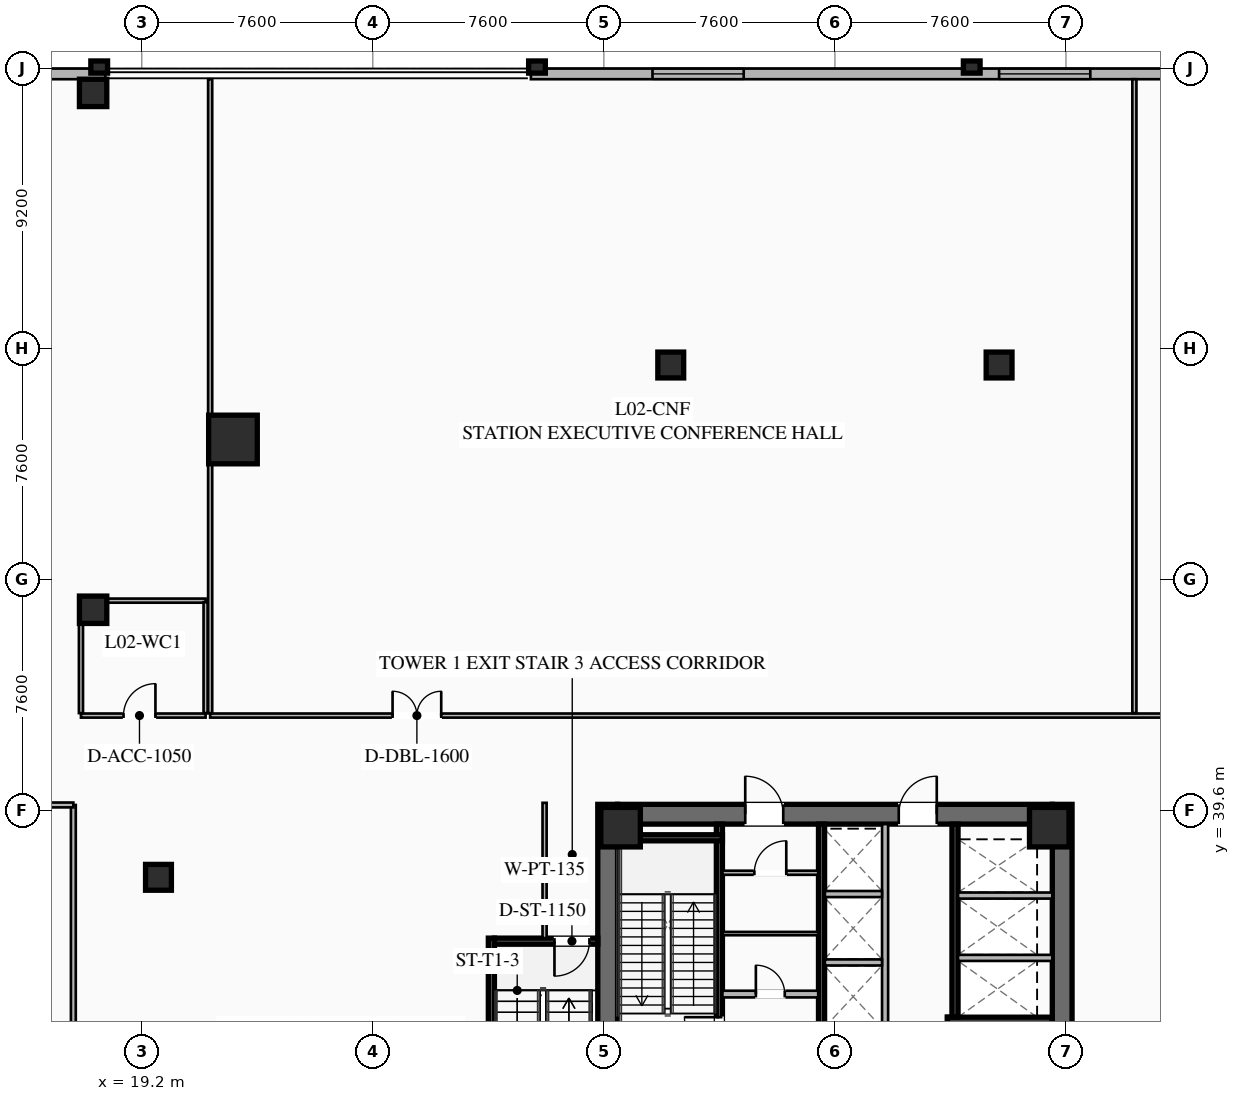
"""IFC4 building model, lengths in metres.
Left out: names, types, materials, properties, quantities, classifications, styles, units other than length and angle.
Written with IfcOpenShell. Run it as: python <this file> out.ifc"""

import sys

from ifc_helpers import new_model, si_unit, direction, frame, frame_2d, origin, origin_2d, place, context, subcontext, project, spatial, rectangle, hollow_rectangle, extrude, element, fill, save


model = new_model("IFC4")
c1 = context("Model", 3, precision=1e-05, world=origin(), true_north=direction((0.0, 1.0)))
c2 = subcontext(c1, "Body", "Model", "MODEL_VIEW")
j1 = project(units=[si_unit("LENGTHUNIT", "METRE"), si_unit("PLANEANGLEUNIT", "RADIAN")], contexts=[c1])
p1 = place(None, origin())
s1 = spatial("IfcSite", under=j1, at=p1, CompositionType="ELEMENT")
p2 = place(p1, origin())
s2 = spatial("IfcBuilding", under=s1, at=p2, CompositionType="ELEMENT")
p3 = place(p2, frame((0.0, 0.0, 10.2)))
s3 = spatial("IfcBuildingStorey", under=s2, at=p3, CompositionType="ELEMENT", Elevation=10.2)
for number, where, z_axis, x_axis in (
    (1, (34.525, 24.2, 0.0), (0.0, 0.0, 1.0), (0.0, 1.0, 0.0)),
    (2, (49.475, 39.8, 0.0), (0.0, 0.0, 1.0), (0.0, -1.0, 0.0)),
):
    element("IfcWall", number, at=place(p3, frame(where, z_axis=z_axis, x_axis=x_axis)), inside=s3, PredefinedType="SHEAR", context=c2, shape_type="SweptSolid", body=[
        extrude(rectangle(XDim=15.6, YDim=0.65, at=frame_2d((7.8, 0.0))), origin(), (0.0, 0.0, 1.0), 5.4),
    ])
p4 = place(p3, frame((34.85, 39.475, 0.0), z_axis=(0.0, 0.0, 1.0), x_axis=(1.0, 0.0, 0.0)))
e3 = element("IfcWall", 3, at=p4, inside=s3, PredefinedType="SHEAR", context=c2, shape_type="SweptSolid", body=[
    extrude(rectangle(XDim=14.3, YDim=0.65, at=frame_2d((7.15, 0.0))), origin(), (0.0, 0.0, 1.0), 5.4),
])
p5 = place(p4, frame((4.2, 0.0, 0.0)))
e4 = element("IfcOpeningElement", 4, at=p5, cuts=e3, PredefinedType="OPENING", context=c2, shape_type="SweptSolid", body=[
    extrude(rectangle(XDim=1.25, YDim=2.25, at=frame_2d((0.625, 1.125))), frame((0.0, 0.335, 0.0), z_axis=(0.0, -1.0, 0.0), x_axis=(1.0, 0.0, 0.0)), (0.0, 0.0, 1.0), 0.67),
])
p6 = place(p4, frame((9.25, 0.0, 0.0)))
e5 = element("IfcOpeningElement", 5, at=p6, cuts=e3, PredefinedType="OPENING", context=c2, shape_type="SweptSolid", body=[
    extrude(rectangle(XDim=1.25, YDim=2.25, at=frame_2d((0.625, 1.125))), frame((0.0, 0.335, 0.0), z_axis=(0.0, -1.0, 0.0), x_axis=(1.0, 0.0, 0.0)), (0.0, 0.0, 1.0), 0.67),
])
for number, where, z_axis, x_axis in (
    (6, (49.05, 39.05, 0.0), (0.0, 0.0, 1.0), (1.0, 0.0, 0.0)),
    (7, (34.95, 39.05, 0.0), (0.0, 0.0, 1.0), (1.0, 0.0, 0.0)),
):
    element("IfcColumn", number, at=place(p3, frame(where, z_axis=z_axis, x_axis=x_axis)), inside=s3, PredefinedType="COLUMN", context=c2, shape_type="SweptSolid", body=[
        extrude(hollow_rectangle(XDim=1.3, YDim=1.3, WallThickness=0.05, at=origin_2d()), origin(), (0.0, 0.0, 1.0), 5.14),
    ])
p7 = place(p3, frame((22.2, 51.8, 0.0), z_axis=(0.0, 0.0, 1.0), x_axis=(1.0, 0.0, 0.0)))
e8 = element("IfcColumn", 8, at=p7, inside=s3, PredefinedType="COLUMN", context=c2, shape_type="SweptSolid", body=[
    extrude(hollow_rectangle(XDim=1.6, YDim=1.6, WallThickness=0.06, at=origin_2d()), origin(), (0.0, 0.0, 1.0), 5.14),
])
for number, where, z_axis, x_axis in (
    (9, (47.4, 54.25, 0.0), (0.0, 0.0, 1.0), (1.0, 0.0, 0.0)),
    (10, (36.6, 54.25, 0.0), (0.0, 0.0, 1.0), (1.0, 0.0, 0.0)),
    (11, (19.75, 37.4, 0.0), (0.0, 0.0, 1.0), (1.0, 0.0, 0.0)),
):
    element("IfcColumn", number, at=place(p3, frame(where, z_axis=z_axis, x_axis=x_axis)), inside=s3, PredefinedType="COLUMN", context=c2, shape_type="SweptSolid", body=[
        extrude(hollow_rectangle(XDim=0.85, YDim=0.85, WallThickness=0.035, at=origin_2d()), origin(), (0.0, 0.0, 1.0), 5.14),
    ])
for number, where, z_axis, x_axis in (
    (12, (17.6, 63.2, 0.0), (0.0, 0.0, 1.0), (1.0, 0.0, 0.0)),
    (13, (17.6, 46.2, 0.0), (0.0, 0.0, 1.0), (1.0, 0.0, 0.0)),
):
    element("IfcColumn", number, at=place(p3, frame(where, z_axis=z_axis, x_axis=x_axis)), inside=s3, PredefinedType="COLUMN", context=c2, shape_type="SweptSolid", body=[
        extrude(rectangle(XDim=0.9, YDim=0.9, at=origin_2d()), origin(), (0.0, 0.0, 1.0), 5.14),
    ])
p8 = place(p3, frame((0.0, 63.825, 0.0), z_axis=(0.0, 0.0, 1.0), x_axis=(1.0, 0.0, 0.0)))
e14 = element("IfcWall", 14, at=p8, inside=s3, PredefinedType="SOLIDWALL", context=c2, shape_type="SweptSolid", body=[
    extrude(rectangle(XDim=18.0, YDim=0.35, at=frame_2d((9.0, 0.0))), origin(), (0.0, 0.0, 1.0), 5.14),
])
p9 = place(p8, frame((4.2, 0.0, 0.95)))
e15 = element("IfcOpeningElement", 15, at=p9, cuts=e14, PredefinedType="OPENING", context=c2, shape_type="SweptSolid", body=[
    extrude(rectangle(XDim=3.0, YDim=2.4, at=frame_2d((1.5, 1.2))), frame((0.0, 0.185, 0.0), z_axis=(0.0, -1.0, 0.0), x_axis=(1.0, 0.0, 0.0)), (0.0, 0.0, 1.0), 0.37),
])
p10 = place(p8, frame((9.8, 0.0, 0.95)))
e16 = element("IfcOpeningElement", 16, at=p10, cuts=e14, PredefinedType="OPENING", context=c2, shape_type="SweptSolid", body=[
    extrude(rectangle(XDim=3.0, YDim=2.4, at=frame_2d((1.5, 1.2))), frame((0.0, 0.185, 0.0), z_axis=(0.0, -1.0, 0.0), x_axis=(1.0, 0.0, 0.0)), (0.0, 0.0, 1.0), 0.37),
])
p11 = place(p3, frame((32.0, 63.825, 0.0), z_axis=(0.0, 0.0, 1.0), x_axis=(1.0, 0.0, 0.0)))
e17 = element("IfcWall", 17, at=p11, inside=s3, PredefinedType="SOLIDWALL", context=c2, shape_type="SweptSolid", body=[
    extrude(rectangle(XDim=32.0, YDim=0.35, at=frame_2d((16.0, 0.0))), origin(), (0.0, 0.0, 1.0), 5.14),
])
p12 = place(p11, frame((4.0, 0.0, 0.95)))
e18 = element("IfcOpeningElement", 18, at=p12, cuts=e17, PredefinedType="OPENING", context=c2, shape_type="SweptSolid", body=[
    extrude(rectangle(XDim=3.0, YDim=2.4, at=frame_2d((1.5, 1.2))), frame((0.0, 0.185, 0.0), z_axis=(0.0, -1.0, 0.0), x_axis=(1.0, 0.0, 0.0)), (0.0, 0.0, 1.0), 0.37),
])
p13 = place(p11, frame((15.4, 0.0, 0.95)))
e19 = element("IfcOpeningElement", 19, at=p13, cuts=e17, PredefinedType="OPENING", context=c2, shape_type="SweptSolid", body=[
    extrude(rectangle(XDim=3.0, YDim=2.4, at=frame_2d((1.5, 1.2))), frame((0.0, 0.185, 0.0), z_axis=(0.0, -1.0, 0.0), x_axis=(1.0, 0.0, 0.0)), (0.0, 0.0, 1.0), 0.37),
])
for number, where, z_axis, x_axis in (
    (20, (17.8, 64.05, 0.0), (0.0, 0.0, 1.0), (1.0, 0.0, 0.0)),
    (21, (32.2, 64.05, 0.0), (0.0, 0.0, 1.0), (1.0, 0.0, 0.0)),
    (22, (46.5, 64.05, 0.0), (0.0, 0.0, 1.0), (1.0, 0.0, 0.0)),
):
    element("IfcColumn", number, at=place(p3, frame(where, z_axis=z_axis, x_axis=x_axis)), inside=s3, PredefinedType="PILASTER", context=c2, shape_type="SweptSolid", body=[
        extrude(rectangle(XDim=0.55, YDim=0.4, at=origin_2d()), origin(), (0.0, 0.0, 1.0), 5.14),
    ])
p14 = place(p3, frame((38.2, 31.2, 0.0), z_axis=(0.0, 0.0, 1.0), x_axis=(0.0, 1.0, 0.0)))
e23 = element("IfcWall", 23, at=p14, inside=s3, PredefinedType="SHEAR", context=c2, shape_type="SweptSolid", body=[
    extrude(rectangle(XDim=7.95, YDim=0.2, at=frame_2d((3.975, 0.0))), origin(), (0.0, 0.0, 1.0), 5.14),
])
p15 = place(p14, frame((0.45, 0.0, 0.0)))
e24 = element("IfcOpeningElement", 24, at=p15, cuts=e23, PredefinedType="OPENING", context=c2, shape_type="SweptSolid", body=[
    extrude(rectangle(XDim=1.15, YDim=2.2, at=frame_2d((0.575, 1.1))), frame((0.0, 0.11, 0.0), z_axis=(0.0, -1.0, 0.0), x_axis=(1.0, 0.0, 0.0)), (0.0, 0.0, 1.0), 0.22),
])
p16 = place(p3, frame((34.85, 38.7, 0.0), z_axis=(0.0, 0.0, 1.0), x_axis=(1.0, 0.0, 0.0)))
e25 = element("IfcWall", 25, at=p16, inside=s3, PredefinedType="SHEAR", context=c2, shape_type="SweptSolid", body=[
    extrude(rectangle(XDim=3.45, YDim=0.2, at=frame_2d((1.725, 0.0))), origin(), (0.0, 0.0, 1.0), 5.14),
])
p17 = place(p3, frame((45.8, 32.8, 0.0), z_axis=(0.0, 0.0, 1.0), x_axis=(0.0, -1.0, 0.0)))
e26 = element("IfcWall", 26, at=p17, inside=s3, PredefinedType="SHEAR", context=c2, shape_type="SweptSolid", body=[
    extrude(rectangle(XDim=7.95, YDim=0.2, at=frame_2d((3.975, 0.0))), origin(), (0.0, 0.0, 1.0), 5.14),
])
p18 = place(p17, frame((0.45, 0.0, 0.0)))
e27 = element("IfcOpeningElement", 27, at=p18, cuts=e26, PredefinedType="OPENING", context=c2, shape_type="SweptSolid", body=[
    extrude(rectangle(XDim=1.15, YDim=2.2, at=frame_2d((0.575, 1.1))), frame((0.0, 0.11, 0.0), z_axis=(0.0, -1.0, 0.0), x_axis=(1.0, 0.0, 0.0)), (0.0, 0.0, 1.0), 0.22),
])
p19 = place(p3, frame((45.7, 32.7, 0.0), z_axis=(0.0, 0.0, 1.0), x_axis=(1.0, 0.0, 0.0)))
e28 = element("IfcWall", 28, at=p19, inside=s3, PredefinedType="SHEAR", context=c2, shape_type="SweptSolid", body=[
    extrude(rectangle(XDim=3.45, YDim=0.2, at=frame_2d((1.725, 0.0))), origin(), (0.0, 0.0, 1.0), 5.14),
])
p20 = place(p3, frame((41.56, 24.85, 0.0), z_axis=(0.0, 0.0, 1.0), x_axis=(0.0, 1.0, 0.0)))
e29 = element("IfcWall", 29, at=p20, inside=s3, PredefinedType="SHEAR", context=c2, shape_type="SweptSolid", body=[
    extrude(rectangle(XDim=14.3, YDim=0.2, at=frame_2d((7.15, 0.0))), origin(), (0.0, 0.0, 1.0), 5.14),
])
p21 = place(p3, frame((38.3, 33.56, 0.0), z_axis=(0.0, 0.0, 1.0), x_axis=(1.0, 0.0, 0.0)))
e30 = element("IfcWall", 30, at=p21, inside=s3, PredefinedType="SOLIDWALL", context=c2, shape_type="SweptSolid", body=[
    extrude(rectangle(XDim=3.15, YDim=0.22, at=frame_2d((1.575, 0.0))), origin(), (0.0, 0.0, 1.0), 2.71),
])
p22 = place(p21, frame((1.1, 0.0, 0.0)))
e31 = element("IfcOpeningElement", 31, at=p22, cuts=e30, PredefinedType="OPENING", context=c2, shape_type="SweptSolid", body=[
    extrude(rectangle(XDim=0.95, YDim=2.05, at=frame_2d((0.475, 1.025))), frame((0.0, 0.12, 0.0), z_axis=(0.0, -1.0, 0.0), x_axis=(1.0, 0.0, 0.0)), (0.0, 0.0, 1.0), 0.24),
])
p23 = place(p3, frame((45.95, 39.15, 0.0), z_axis=(0.0, 0.0, 1.0), x_axis=(0.0, -1.0, 0.0)))
e32 = element("IfcWall", 32, at=p23, inside=s3, PredefinedType="SHEAR", context=c2, shape_type="SweptSolid", body=[
    extrude(rectangle(XDim=6.35, YDim=0.2, at=frame_2d((3.175, 0.0))), origin(), (0.0, 0.0, 1.0), 5.14),
])
for number, where, z_axis, x_axis in (
    (33, (46.05, 34.75, 0.0), (0.0, 0.0, 1.0), (1.0, 0.0, 0.0)),
    (34, (46.05, 36.8, 0.0), (0.0, 0.0, 1.0), (1.0, 0.0, 0.0)),
):
    element("IfcWall", number, at=place(p3, frame(where, z_axis=z_axis, x_axis=x_axis)), inside=s3, PredefinedType="SOLIDWALL", context=c2, shape_type="SweptSolid", body=[
        extrude(rectangle(XDim=3.1, YDim=0.2, at=frame_2d((1.55, 0.0))), origin(), (0.0, 0.0, 1.0), 5.14),
    ])
p24 = place(p3, frame((38.3, 37.55, 0.0), z_axis=(0.0, 0.0, 1.0), x_axis=(1.0, 0.0, 0.0)))
e35 = element("IfcWall", 35, at=p24, inside=s3, PredefinedType="PARTITIONING", context=c2, shape_type="SweptSolid", body=[
    extrude(rectangle(XDim=3.15, YDim=0.135, at=frame_2d((1.575, 0.0))), origin(), (0.0, 0.0, 1.0), 2.71),
])
p25 = place(p24, frame((1.05, 0.0, 0.0)))
e36 = element("IfcOpeningElement", 36, at=p25, cuts=e35, PredefinedType="OPENING", context=c2, shape_type="SweptSolid", body=[
    extrude(rectangle(XDim=1.05, YDim=2.2, at=frame_2d((0.525, 1.1))), frame((0.0, 0.077, 0.0), z_axis=(0.0, -1.0, 0.0), x_axis=(1.0, 0.0, 0.0)), (0.0, 0.0, 1.0), 0.155),
])
p26 = place(p3, frame((38.3, 35.55, 0.0), z_axis=(0.0, 0.0, 1.0), x_axis=(1.0, 0.0, 0.0)))
e37 = element("IfcWall", 37, at=p26, inside=s3, PredefinedType="PARTITIONING", context=c2, shape_type="SweptSolid", body=[
    extrude(rectangle(XDim=3.15, YDim=0.11, at=frame_2d((1.575, 0.0))), origin(), (0.0, 0.0, 1.0), 2.71),
])
p27 = place(p3, frame((43.65, 32.35, 0.0), z_axis=(0.0, 0.0, 1.0), x_axis=(0.0, 1.0, 0.0)))
e38 = element("IfcWall", 38, at=p27, inside=s3, PredefinedType="SOLIDWALL", context=c2, shape_type="SweptSolid", body=[
    extrude(rectangle(XDim=6.8, YDim=0.2, at=frame_2d((3.4, 0.0))), origin(), (0.0, 0.0, 1.0), 5.14),
])
for number, where, z_axis, x_axis in (
    (39, (41.67, 34.6, 0.0), (0.0, 0.0, 1.0), (1.0, 0.0, 0.0)),
    (40, (41.67, 36.85, 0.0), (0.0, 0.0, 1.0), (1.0, 0.0, 0.0)),
):
    element("IfcWall", number, at=place(p3, frame(where, z_axis=z_axis, x_axis=x_axis)), inside=s3, PredefinedType="SOLIDWALL", context=c2, shape_type="SweptSolid", body=[
        extrude(rectangle(XDim=1.88, YDim=0.2, at=frame_2d((0.94, 0.0))), origin(), (0.0, 0.0, 1.0), 5.14),
    ])
p28 = place(p3, frame((30.7, 28.6, 0.0), z_axis=(0.0, 0.0, 1.0), x_axis=(0.0, 1.0, 0.0)))
e41 = element("IfcWall", 41, at=p28, inside=s3, PredefinedType="SHEAR", context=c2, shape_type="SweptSolid", body=[
    extrude(rectangle(XDim=6.8, YDim=0.2, at=frame_2d((3.4, 0.0))), origin(), (0.0, 0.0, 1.0), 5.14),
])
p29 = place(p3, frame((34.2, 35.3, 0.0), z_axis=(0.0, 0.0, 1.0), x_axis=(-1.0, 0.0, 0.0)))
e42 = element("IfcWall", 42, at=p29, inside=s3, PredefinedType="SHEAR", context=c2, shape_type="SweptSolid", body=[
    extrude(rectangle(XDim=3.4, YDim=0.2, at=frame_2d((1.7, 0.0))), origin(), (0.0, 0.0, 1.0), 5.14),
])
p30 = place(p29, frame((0.275, 0.0, 0.0)))
e43 = element("IfcOpeningElement", 43, at=p30, cuts=e42, PredefinedType="OPENING", context=c2, shape_type="SweptSolid", body=[
    extrude(rectangle(XDim=1.15, YDim=2.2, at=frame_2d((0.575, 1.1))), frame((0.0, 0.11, 0.0), z_axis=(0.0, -1.0, 0.0), x_axis=(1.0, 0.0, 0.0)), (0.0, 0.0, 1.0), 0.22),
])
p31 = place(p3, frame((32.45, 35.4, 0.0), z_axis=(0.0, 0.0, 1.0), x_axis=(0.0, 1.0, 0.0)))
e44 = element("IfcWall", 44, at=p31, inside=s3, PredefinedType="PARTITIONING", context=c2, shape_type="SweptSolid", body=[
    extrude(rectangle(XDim=4.45, YDim=0.135, at=frame_2d((2.225, 0.0))), origin(), (0.0, 0.0, 1.0), 2.71),
])
p32 = place(p3, frame((16.95, 24.35, 0.0), z_axis=(0.0, 0.0, 1.0), x_axis=(0.0, 1.0, 0.0)))
e45 = element("IfcWall", 45, at=p32, inside=s3, PredefinedType="PARTITIONING", context=c2, shape_type="SweptSolid", body=[
    extrude(rectangle(XDim=15.43, YDim=0.16, at=frame_2d((7.715, 0.0))), origin(), (0.0, 0.0, 1.0), 2.71),
])
p33 = place(p3, frame((0.35, 39.78, 0.0), z_axis=(0.0, 0.0, 1.0), x_axis=(1.0, 0.0, 0.0)))
e46 = element("IfcWall", 46, at=p33, inside=s3, PredefinedType="PARTITIONING", context=c2, shape_type="SweptSolid", body=[
    extrude(rectangle(XDim=16.6, YDim=0.16, at=frame_2d((8.3, 0.0))), origin(), (0.0, 0.0, 1.0), 2.71),
])
p34 = place(p3, frame((21.45, 42.72, 0.0), z_axis=(0.0, 0.0, 1.0), x_axis=(1.0, 0.0, 0.0)))
e47 = element("IfcWall", 47, at=p34, inside=s3, PredefinedType="PARTITIONING", context=c2, shape_type="SweptSolid", body=[
    extrude(rectangle(XDim=50.75, YDim=0.135, at=frame_2d((25.375, 0.0))), origin(), (0.0, 0.0, 1.0), 2.71),
])
p35 = place(p34, frame((6.0, 0.0, 0.0)))
e48 = element("IfcOpeningElement", 48, at=p35, cuts=e47, PredefinedType="OPENING", context=c2, shape_type="SweptSolid", body=[
    extrude(rectangle(XDim=1.6, YDim=2.25, at=frame_2d((0.8, 1.125))), frame((0.0, 0.077, 0.0), z_axis=(0.0, -1.0, 0.0), x_axis=(1.0, 0.0, 0.0)), (0.0, 0.0, 1.0), 0.155),
])
p36 = place(p34, frame((36.0, 0.0, 0.0)))
e49 = element("IfcOpeningElement", 49, at=p36, cuts=e47, PredefinedType="OPENING", context=c2, shape_type="SweptSolid", body=[
    extrude(rectangle(XDim=0.95, YDim=2.05, at=frame_2d((0.475, 1.025))), frame((0.0, 0.077, 0.0), z_axis=(0.0, -1.0, 0.0), x_axis=(1.0, 0.0, 0.0)), (0.0, 0.0, 1.0), 0.155),
])
for number, where, z_axis, x_axis in (
    (50, (21.45, 42.8, 0.0), (0.0, 0.0, 1.0), (0.0, 1.0, 0.0)),
    (51, (51.85, 42.8, 0.0), (0.0, 0.0, 1.0), (0.0, 1.0, 0.0)),
):
    element("IfcWall", number, at=place(p3, frame(where, z_axis=z_axis, x_axis=x_axis)), inside=s3, PredefinedType="PARTITIONING", context=c2, shape_type="SweptSolid", body=[
        extrude(rectangle(XDim=20.85, YDim=0.135, at=frame_2d((10.425, 0.0))), origin(), (0.0, 0.0, 1.0), 2.71),
    ])
p37 = place(p3, frame((17.2, 42.72, 0.0), z_axis=(0.0, 0.0, 1.0), x_axis=(1.0, 0.0, 0.0)))
e52 = element("IfcWall", 52, at=p37, inside=s3, PredefinedType="PARTITIONING", context=c2, shape_type="SweptSolid", body=[
    extrude(rectangle(XDim=4.1, YDim=0.135, at=frame_2d((2.05, 0.0))), origin(), (0.0, 0.0, 1.0), 2.71),
])
p38 = place(p37, frame((1.4, 0.0, 0.0)))
e53 = element("IfcOpeningElement", 53, at=p38, cuts=e52, PredefinedType="OPENING", context=c2, shape_type="SweptSolid", body=[
    extrude(rectangle(XDim=1.05, YDim=2.2, at=frame_2d((0.525, 1.1))), frame((0.0, 0.077, 0.0), z_axis=(0.0, -1.0, 0.0), x_axis=(1.0, 0.0, 0.0)), (0.0, 0.0, 1.0), 0.155),
])
p39 = place(p3, frame((17.2, 46.5, 0.0), z_axis=(0.0, 0.0, 1.0), x_axis=(1.0, 0.0, 0.0)))
e54 = element("IfcWall", 54, at=p39, inside=s3, PredefinedType="PARTITIONING", context=c2, shape_type="SweptSolid", body=[
    extrude(rectangle(XDim=4.1, YDim=0.135, at=frame_2d((2.05, 0.0))), origin(), (0.0, 0.0, 1.0), 2.71),
])
for number, where, z_axis, x_axis in (
    (55, (17.2, 42.8, 0.0), (0.0, 0.0, 1.0), (0.0, 1.0, 0.0)),
    (56, (21.3, 42.8, 0.0), (0.0, 0.0, 1.0), (0.0, 1.0, 0.0)),
):
    element("IfcWall", number, at=place(p3, frame(where, z_axis=z_axis, x_axis=x_axis)), inside=s3, PredefinedType="PARTITIONING", context=c2, shape_type="SweptSolid", body=[
        extrude(rectangle(XDim=3.65, YDim=0.135, at=frame_2d((1.825, 0.0))), origin(), (0.0, 0.0, 1.0), 2.71),
    ])
p40 = place(p12, origin())
e57 = element("IfcWindow", 57, at=p40, inside=s3, PartitioningType="SINGLE_PANEL", PredefinedType="WINDOW", context=c2, shape_type="SweptSolid", body=[
    extrude(rectangle(XDim=3.0, YDim=2.4, at=frame_2d((1.5, 1.2))), frame((0.0, 0.03, 0.0), z_axis=(0.0, -1.0, 0.0), x_axis=(1.0, 0.0, 0.0)), (0.0, 0.0, 1.0), 0.06),
])
fill(e18, e57)
p41 = place(p13, origin())
e58 = element("IfcWindow", 58, at=p41, inside=s3, PartitioningType="SINGLE_PANEL", PredefinedType="WINDOW", context=c2, shape_type="SweptSolid", body=[
    extrude(rectangle(XDim=3.0, YDim=2.4, at=frame_2d((1.5, 1.2))), frame((0.0, 0.03, 0.0), z_axis=(0.0, -1.0, 0.0), x_axis=(1.0, 0.0, 0.0)), (0.0, 0.0, 1.0), 0.06),
])
fill(e19, e58)
p42 = place(p5, origin())
e59 = element("IfcDoor", 59, at=p42, inside=s3, OperationType="SINGLE_SWING_LEFT", PredefinedType="DOOR", context=c2, shape_type="SweptSolid", body=[
    extrude(rectangle(XDim=1.25, YDim=2.25, at=frame_2d((0.625, 1.125))), frame((0.0, 0.025, 0.0), z_axis=(0.0, -1.0, 0.0), x_axis=(1.0, 0.0, 0.0)), (0.0, 0.0, 1.0), 0.05),
])
fill(e4, e59)
p43 = place(p6, origin())
e60 = element("IfcDoor", 60, at=p43, inside=s3, OperationType="SINGLE_SWING_RIGHT", PredefinedType="DOOR", context=c2, shape_type="SweptSolid", body=[
    extrude(rectangle(XDim=1.25, YDim=2.25, at=frame_2d((0.625, 1.125))), frame((0.0, 0.025, 0.0), z_axis=(0.0, -1.0, 0.0), x_axis=(1.0, 0.0, 0.0)), (0.0, 0.0, 1.0), 0.05),
])
fill(e5, e60)
p44 = place(p15, origin())
e61 = element("IfcDoor", 61, at=p44, inside=s3, OperationType="SINGLE_SWING_RIGHT", PredefinedType="DOOR", context=c2, shape_type="SweptSolid", body=[
    extrude(rectangle(XDim=1.15, YDim=2.2, at=frame_2d((0.575, 1.1))), frame((0.0, 0.025, 0.0), z_axis=(0.0, -1.0, 0.0), x_axis=(1.0, 0.0, 0.0)), (0.0, 0.0, 1.0), 0.05),
])
fill(e24, e61)
p45 = place(p25, origin())
e62 = element("IfcDoor", 62, at=p45, inside=s3, OperationType="SINGLE_SWING_RIGHT", PredefinedType="DOOR", context=c2, shape_type="SweptSolid", body=[
    extrude(rectangle(XDim=1.05, YDim=2.2, at=frame_2d((0.525, 1.1))), frame((0.0, 0.025, 0.0), z_axis=(0.0, -1.0, 0.0), x_axis=(1.0, 0.0, 0.0)), (0.0, 0.0, 1.0), 0.05),
])
fill(e36, e62)
p46 = place(p22, origin())
e63 = element("IfcDoor", 63, at=p46, inside=s3, OperationType="SINGLE_SWING_LEFT", PredefinedType="DOOR", context=c2, shape_type="SweptSolid", body=[
    extrude(rectangle(XDim=0.95, YDim=2.05, at=frame_2d((0.475, 1.025))), frame((0.0, 0.025, 0.0), z_axis=(0.0, -1.0, 0.0), x_axis=(1.0, 0.0, 0.0)), (0.0, 0.0, 1.0), 0.05),
])
fill(e31, e63)
p47 = place(p30, origin())
e64 = element("IfcDoor", 64, at=p47, inside=s3, OperationType="SINGLE_SWING_RIGHT", PredefinedType="DOOR", context=c2, shape_type="SweptSolid", body=[
    extrude(rectangle(XDim=1.15, YDim=2.2, at=frame_2d((0.575, 1.1))), frame((0.0, 0.025, 0.0), z_axis=(0.0, -1.0, 0.0), x_axis=(1.0, 0.0, 0.0)), (0.0, 0.0, 1.0), 0.05),
])
fill(e43, e64)
p48 = place(p35, origin())
e65 = element("IfcDoor", 65, at=p48, inside=s3, OperationType="DOUBLE_DOOR_SINGLE_SWING", PredefinedType="DOOR", context=c2, shape_type="SweptSolid", body=[
    extrude(rectangle(XDim=1.6, YDim=2.25, at=frame_2d((0.8, 1.125))), frame((0.0, 0.025, 0.0), z_axis=(0.0, -1.0, 0.0), x_axis=(1.0, 0.0, 0.0)), (0.0, 0.0, 1.0), 0.05),
])
fill(e48, e65)
p49 = place(p38, origin())
e66 = element("IfcDoor", 66, at=p49, inside=s3, OperationType="SINGLE_SWING_RIGHT", PredefinedType="DOOR", context=c2, shape_type="SweptSolid", body=[
    extrude(rectangle(XDim=1.05, YDim=2.2, at=frame_2d((0.525, 1.1))), frame((0.0, 0.025, 0.0), z_axis=(0.0, -1.0, 0.0), x_axis=(1.0, 0.0, 0.0)), (0.0, 0.0, 1.0), 0.05),
])
fill(e53, e66)
save(model, sys.argv[1])
